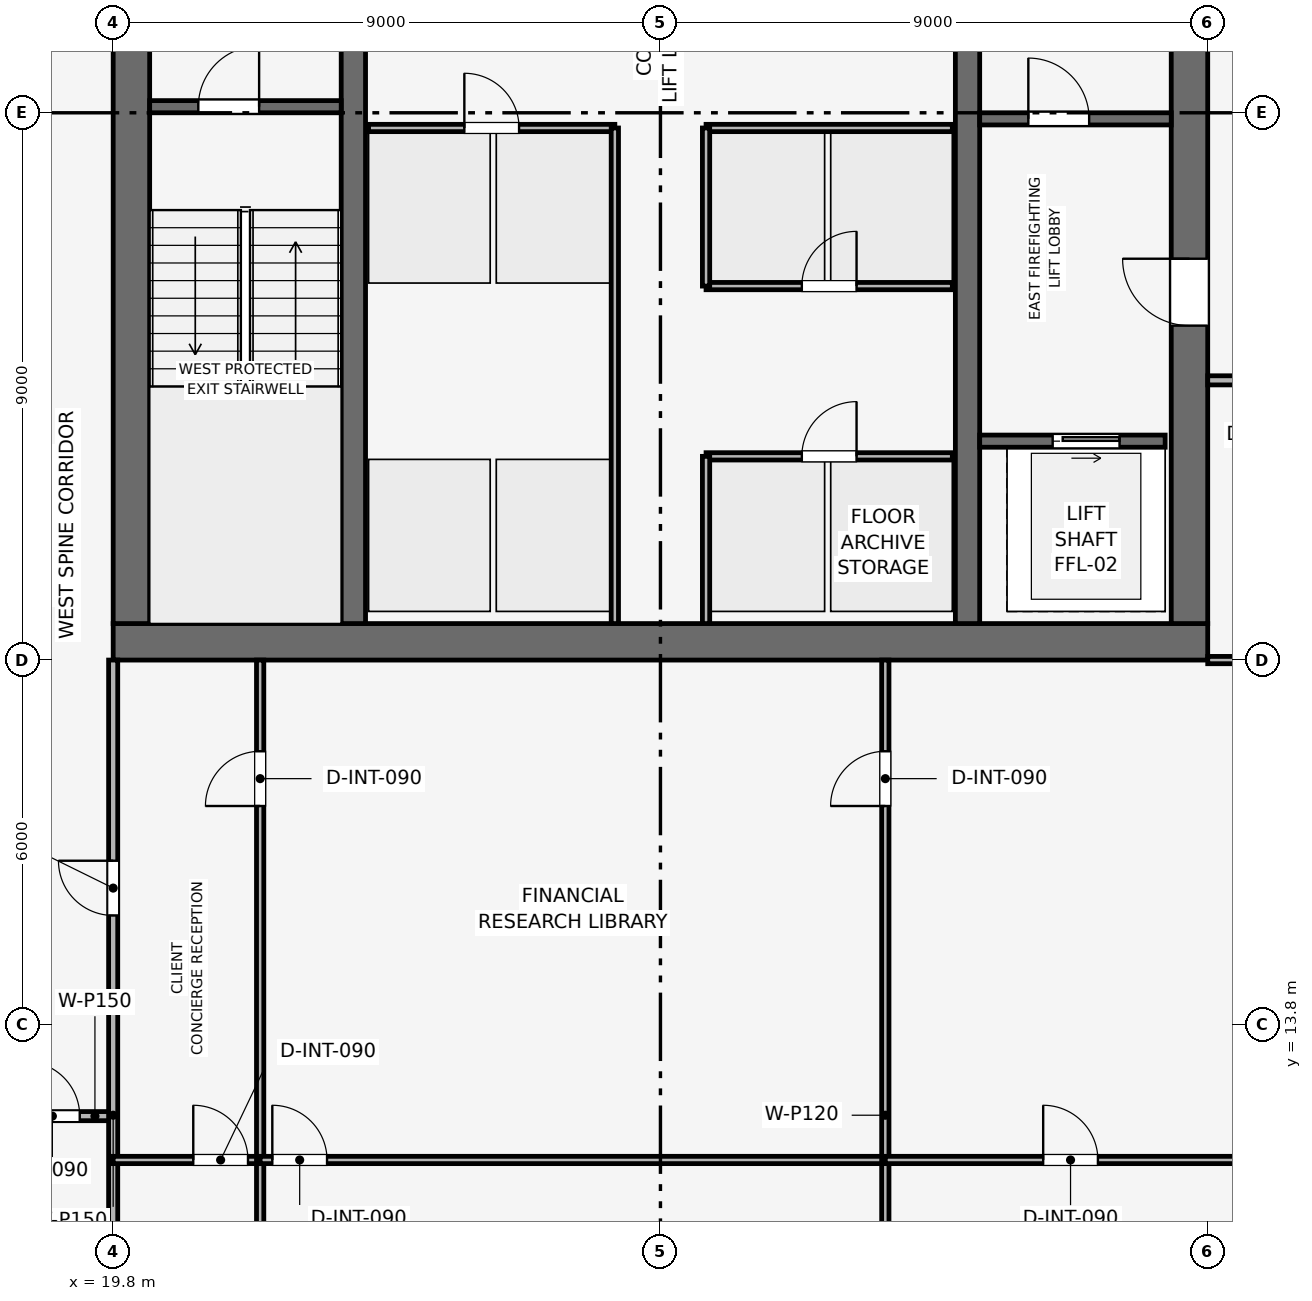
"""IFC4 building model, lengths in metres.
Left out: names, types, materials, properties, quantities, classifications, styles, units other than length and angle.
Written with IfcOpenShell. Run it as: python <this file> out.ifc"""

import sys

from ifc_helpers import new_model, si_unit, direction, frame, frame_2d, origin, place, context, subcontext, project, spatial, rectangle, extrude, element, fill, save


model = new_model("IFC4")
c1 = context("Model", 3, precision=1e-05, world=origin(), true_north=direction((0.0, 1.0)))
c2 = subcontext(c1, "Body", "Model", "MODEL_VIEW")
j1 = project(units=[si_unit("LENGTHUNIT", "METRE"), si_unit("PLANEANGLEUNIT", "RADIAN")], contexts=[c1])
p1 = place(None, origin())
s1 = spatial("IfcSite", under=j1, at=p1, CompositionType="ELEMENT")
p2 = place(p1, origin())
s2 = spatial("IfcBuilding", under=s1, at=p2, CompositionType="ELEMENT")
p3 = place(p2, frame((0.0, 0.0, 325.5)))
s3 = spatial("IfcBuildingStorey", under=s2, at=p3, CompositionType="ELEMENT", Elevation=325.5)
p4 = place(p3, frame((19.8, 20.1, 0.0), z_axis=(0.0, 0.0, 1.0), x_axis=(1.0, 0.0, 0.0)))
e1 = element("IfcWall", 1, at=p4, inside=s3, PredefinedType="SHEAR", context=c2, shape_type="SweptSolid", body=[
    extrude(rectangle(XDim=18.0, YDim=0.6, at=frame_2d((9.0, 0.0))), origin(), (0.0, 0.0, 1.0), 3.75),
])
p5 = place(p3, frame((20.1, 20.4, 0.0), z_axis=(0.0, 0.0, 1.0), x_axis=(0.0, 1.0, 0.0)))
e2 = element("IfcWall", 2, at=p5, inside=s3, PredefinedType="SHEAR", context=c2, shape_type="SweptSolid", body=[
    extrude(rectangle(XDim=16.8, YDim=0.6, at=frame_2d((8.4, 0.0))), origin(), (0.0, 0.0, 1.0), 3.75),
])
p6 = place(p5, frame((10.4, 0.0, 0.0)))
e3 = element("IfcOpeningElement", 3, at=p6, cuts=e2, PredefinedType="OPENING", context=c2, shape_type="SweptSolid", body=[
    extrude(rectangle(XDim=1.1, YDim=2.15, at=frame_2d((0.55, 1.075))), frame((0.0, 0.31, 0.0), z_axis=(0.0, -1.0, 0.0), x_axis=(1.0, 0.0, 0.0)), (0.0, 0.0, 1.0), 0.62),
])
p7 = place(p3, frame((37.5, 20.4, 0.0), z_axis=(0.0, 0.0, 1.0), x_axis=(0.0, 1.0, 0.0)))
e4 = element("IfcWall", 4, at=p7, inside=s3, PredefinedType="SHEAR", context=c2, shape_type="SweptSolid", body=[
    extrude(rectangle(XDim=16.8, YDim=0.6, at=frame_2d((8.4, 0.0))), origin(), (0.0, 0.0, 1.0), 3.75),
])
p8 = place(p7, frame((4.9, 0.0, 0.0)))
e5 = element("IfcOpeningElement", 5, at=p8, cuts=e4, PredefinedType="OPENING", context=c2, shape_type="SweptSolid", body=[
    extrude(rectangle(XDim=1.1, YDim=2.15, at=frame_2d((0.55, 1.075))), frame((0.0, 0.31, 0.0), z_axis=(0.0, -1.0, 0.0), x_axis=(1.0, 0.0, 0.0)), (0.0, 0.0, 1.0), 0.62),
])
for number, where, z_axis, x_axis in (
    (6, (23.75, 20.4, 0.0), (0.0, 0.0, 1.0), (0.0, 1.0, 0.0)),
    (7, (33.85, 20.4, 0.0), (0.0, 0.0, 1.0), (0.0, 1.0, 0.0)),
):
    element("IfcWall", number, at=place(p3, frame(where, z_axis=z_axis, x_axis=x_axis)), inside=s3, PredefinedType="SHEAR", context=c2, shape_type="SweptSolid", body=[
        extrude(rectangle(XDim=16.8, YDim=0.4, at=frame_2d((8.4, 0.0))), origin(), (0.0, 0.0, 1.0), 3.75),
    ])
p9 = place(p3, frame((20.4, 28.9, 0.0), z_axis=(0.0, 0.0, 1.0), x_axis=(1.0, 0.0, 0.0)))
e8 = element("IfcWall", 8, at=p9, inside=s3, PredefinedType="SHEAR", context=c2, shape_type="SweptSolid", body=[
    extrude(rectangle(XDim=3.15, YDim=0.2, at=frame_2d((1.575, 0.0))), origin(), (0.0, 0.0, 1.0), 3.51),
])
p10 = place(p9, frame((0.8, 0.0, 0.0)))
e9 = element("IfcOpeningElement", 9, at=p10, cuts=e8, PredefinedType="OPENING", context=c2, shape_type="SweptSolid", body=[
    extrude(rectangle(XDim=1.0, YDim=2.1, at=frame_2d((0.5, 1.05))), frame((0.0, 0.11, 0.0), z_axis=(0.0, -1.0, 0.0), x_axis=(1.0, 0.0, 0.0)), (0.0, 0.0, 1.0), 0.22),
])
p11 = place(p3, frame((34.05, 28.7, 0.0), z_axis=(0.0, 0.0, 1.0), x_axis=(1.0, 0.0, 0.0)))
e10 = element("IfcWall", 10, at=p11, inside=s3, PredefinedType="SHEAR", context=c2, shape_type="SweptSolid", body=[
    extrude(rectangle(XDim=3.15, YDim=0.2, at=frame_2d((1.575, 0.0))), origin(), (0.0, 0.0, 1.0), 3.51),
])
p12 = place(p11, frame((0.8, 0.0, 0.0)))
e11 = element("IfcOpeningElement", 11, at=p12, cuts=e10, PredefinedType="OPENING", context=c2, shape_type="SweptSolid", body=[
    extrude(rectangle(XDim=1.0, YDim=2.1, at=frame_2d((0.5, 1.05))), frame((0.0, 0.11, 0.0), z_axis=(0.0, -1.0, 0.0), x_axis=(1.0, 0.0, 0.0)), (0.0, 0.0, 1.0), 0.22),
])
p13 = place(p3, frame((34.05, 23.4, 0.0), z_axis=(0.0, 0.0, 1.0), x_axis=(1.0, 0.0, 0.0)))
e12 = element("IfcWall", 12, at=p13, inside=s3, PredefinedType="SHEAR", context=c2, shape_type="SweptSolid", body=[
    extrude(rectangle(XDim=3.05, YDim=0.2, at=frame_2d((1.525, 0.0))), origin(), (0.0, 0.0, 1.0), 3.51),
])
p14 = place(p13, frame((1.2, 0.0, 0.0)))
e13 = element("IfcOpeningElement", 13, at=p14, cuts=e12, PredefinedType="OPENING", context=c2, shape_type="SweptSolid", body=[
    extrude(rectangle(XDim=1.1, YDim=2.15, at=frame_2d((0.55, 1.075))), frame((0.0, 0.11, 0.0), z_axis=(0.0, -1.0, 0.0), x_axis=(1.0, 0.0, 0.0)), (0.0, 0.0, 1.0), 0.22),
])
p15 = place(p3, frame((24.0, 28.55, 0.0), z_axis=(0.0, 0.0, 1.0), x_axis=(1.0, 0.0, 0.0)))
e14 = element("IfcWall", 14, at=p15, inside=s3, PredefinedType="PARTITIONING", context=c2, shape_type="SweptSolid", body=[
    extrude(rectangle(XDim=4.05, YDim=0.12, at=frame_2d((2.025, 0.0))), origin(), (0.0, 0.0, 1.0), 3.51),
])
p16 = place(p15, frame((1.575, 0.0, 0.0)))
e15 = element("IfcOpeningElement", 15, at=p16, cuts=e14, PredefinedType="OPENING", context=c2, shape_type="SweptSolid", body=[
    extrude(rectangle(XDim=0.9, YDim=2.1, at=frame_2d((0.45, 1.05))), frame((0.0, 0.07, 0.0), z_axis=(0.0, -1.0, 0.0), x_axis=(1.0, 0.0, 0.0)), (0.0, 0.0, 1.0), 0.14),
])
p17 = place(p3, frame((28.05, 20.4, 0.0), z_axis=(0.0, 0.0, 1.0), x_axis=(0.0, 1.0, 0.0)))
e16 = element("IfcWall", 16, at=p17, inside=s3, PredefinedType="PARTITIONING", context=c2, shape_type="SweptSolid", body=[
    extrude(rectangle(XDim=8.15, YDim=0.12, at=frame_2d((4.075, 0.0))), origin(), (0.0, 0.0, 1.0), 3.51),
])
p18 = place(p3, frame((29.55, 23.15, 0.0), z_axis=(0.0, 0.0, 1.0), x_axis=(1.0, 0.0, 0.0)))
e17 = element("IfcWall", 17, at=p18, inside=s3, PredefinedType="PARTITIONING", context=c2, shape_type="SweptSolid", body=[
    extrude(rectangle(XDim=4.05, YDim=0.12, at=frame_2d((2.025, 0.0))), origin(), (0.0, 0.0, 1.0), 3.51),
])
p19 = place(p18, frame((1.575, 0.0, 0.0)))
e18 = element("IfcOpeningElement", 18, at=p19, cuts=e17, PredefinedType="OPENING", context=c2, shape_type="SweptSolid", body=[
    extrude(rectangle(XDim=0.9, YDim=2.1, at=frame_2d((0.45, 1.05))), frame((0.0, 0.07, 0.0), z_axis=(0.0, -1.0, 0.0), x_axis=(1.0, 0.0, 0.0)), (0.0, 0.0, 1.0), 0.14),
])
p20 = place(p3, frame((29.55, 20.4, 0.0), z_axis=(0.0, 0.0, 1.0), x_axis=(0.0, 1.0, 0.0)))
e19 = element("IfcWall", 19, at=p20, inside=s3, PredefinedType="PARTITIONING", context=c2, shape_type="SweptSolid", body=[
    extrude(rectangle(XDim=2.75, YDim=0.12, at=frame_2d((1.375, 0.0))), origin(), (0.0, 0.0, 1.0), 3.51),
])
p21 = place(p3, frame((29.55, 25.95, 0.0), z_axis=(0.0, 0.0, 1.0), x_axis=(1.0, 0.0, 0.0)))
e20 = element("IfcWall", 20, at=p21, inside=s3, PredefinedType="PARTITIONING", context=c2, shape_type="SweptSolid", body=[
    extrude(rectangle(XDim=4.05, YDim=0.12, at=frame_2d((2.025, 0.0))), origin(), (0.0, 0.0, 1.0), 3.51),
])
p22 = place(p21, frame((1.575, 0.0, 0.0)))
e21 = element("IfcOpeningElement", 21, at=p22, cuts=e20, PredefinedType="OPENING", context=c2, shape_type="SweptSolid", body=[
    extrude(rectangle(XDim=0.9, YDim=2.1, at=frame_2d((0.45, 1.05))), frame((0.0, 0.07, 0.0), z_axis=(0.0, -1.0, 0.0), x_axis=(1.0, 0.0, 0.0)), (0.0, 0.0, 1.0), 0.14),
])
p23 = place(p3, frame((29.55, 28.55, 0.0), z_axis=(0.0, 0.0, 1.0), x_axis=(1.0, 0.0, 0.0)))
e22 = element("IfcWall", 22, at=p23, inside=s3, PredefinedType="PARTITIONING", context=c2, shape_type="SweptSolid", body=[
    extrude(rectangle(XDim=4.05, YDim=0.12, at=frame_2d((2.025, 0.0))), origin(), (0.0, 0.0, 1.0), 3.51),
])
p24 = place(p3, frame((29.55, 25.95, 0.0), z_axis=(0.0, 0.0, 1.0), x_axis=(0.0, 1.0, 0.0)))
e23 = element("IfcWall", 23, at=p24, inside=s3, PredefinedType="PARTITIONING", context=c2, shape_type="SweptSolid", body=[
    extrude(rectangle(XDim=2.6, YDim=0.12, at=frame_2d((1.3, 0.0))), origin(), (0.0, 0.0, 1.0), 3.51),
])
p25 = place(p3, frame((17.9, 12.3, 0.0), z_axis=(0.0, 0.0, 1.0), x_axis=(1.0, 0.0, 0.0)))
e24 = element("IfcWall", 24, at=p25, inside=s3, PredefinedType="PARTITIONING", context=c2, shape_type="SweptSolid", body=[
    extrude(rectangle(XDim=1.9, YDim=0.15, at=frame_2d((0.95, 0.0))), origin(), (0.0, 0.0, 1.0), 3.51),
])
p26 = place(p25, frame((0.45, 0.0, 0.0)))
e25 = element("IfcOpeningElement", 25, at=p26, cuts=e24, PredefinedType="OPENING", context=c2, shape_type="SweptSolid", body=[
    extrude(rectangle(XDim=0.9, YDim=2.1, at=frame_2d((0.45, 1.05))), frame((0.0, 0.085, 0.0), z_axis=(0.0, -1.0, 0.0), x_axis=(1.0, 0.0, 0.0)), (0.0, 0.0, 1.0), 0.17),
])
p27 = place(p3, frame((19.8, 6.13, 0.0), z_axis=(0.0, 0.0, 1.0), x_axis=(0.0, 1.0, 0.0)))
e26 = element("IfcWall", 26, at=p27, inside=s3, PredefinedType="PARTITIONING", context=c2, shape_type="SweptSolid", body=[
    extrude(rectangle(XDim=13.67, YDim=0.15, at=frame_2d((6.835, 0.0))), origin(), (0.0, 0.0, 1.0), 3.095),
])
p28 = place(p27, frame((9.47, 0.0, 0.0)))
e27 = element("IfcOpeningElement", 27, at=p28, cuts=e26, PredefinedType="OPENING", context=c2, shape_type="SweptSolid", body=[
    extrude(rectangle(XDim=0.9, YDim=2.1, at=frame_2d((0.45, 1.05))), frame((0.0, 0.085, 0.0), z_axis=(0.0, -1.0, 0.0), x_axis=(1.0, 0.0, 0.0)), (0.0, 0.0, 1.0), 0.17),
])
p29 = place(p3, frame((19.8, 11.579, 0.0), z_axis=(0.0, 0.0, 1.0), x_axis=(1.0, 0.0, 0.0)))
e28 = element("IfcWall", 28, at=p29, inside=s3, PredefinedType="PARTITIONING", context=c2, shape_type="SweptSolid", body=[
    extrude(rectangle(XDim=2.417, YDim=0.12, at=frame_2d((1.208, 0.0))), origin(), (0.0, 0.0, 1.0), 3.095),
])
p30 = place(p29, frame((1.317, 0.0, 0.0)))
e29 = element("IfcOpeningElement", 29, at=p30, cuts=e28, PredefinedType="OPENING", context=c2, shape_type="SweptSolid", body=[
    extrude(rectangle(XDim=0.9, YDim=2.1, at=frame_2d((0.45, 1.05))), frame((0.0, 0.07, 0.0), z_axis=(0.0, -1.0, 0.0), x_axis=(1.0, 0.0, 0.0)), (0.0, 0.0, 1.0), 0.14),
])
p31 = place(p3, frame((22.217, 6.13, 0.0), z_axis=(0.0, 0.0, 1.0), x_axis=(0.0, 1.0, 0.0)))
e30 = element("IfcWall", 30, at=p31, inside=s3, PredefinedType="PARTITIONING", context=c2, shape_type="SweptSolid", body=[
    extrude(rectangle(XDim=13.67, YDim=0.12, at=frame_2d((6.835, 0.0))), origin(), (0.0, 0.0, 1.0), 3.135),
])
p32 = place(p31, frame((11.27, 0.0, 0.0)))
e31 = element("IfcOpeningElement", 31, at=p32, cuts=e30, PredefinedType="OPENING", context=c2, shape_type="SweptSolid", body=[
    extrude(rectangle(XDim=0.9, YDim=2.1, at=frame_2d((0.45, 1.05))), frame((0.0, 0.07, 0.0), z_axis=(0.0, -1.0, 0.0), x_axis=(1.0, 0.0, 0.0)), (0.0, 0.0, 1.0), 0.14),
])
p33 = place(p3, frame((22.217, 11.579, 0.0), z_axis=(0.0, 0.0, 1.0), x_axis=(1.0, 0.0, 0.0)))
e32 = element("IfcWall", 32, at=p33, inside=s3, PredefinedType="PARTITIONING", context=c2, shape_type="SweptSolid", body=[
    extrude(rectangle(XDim=10.281, YDim=0.12, at=frame_2d((5.141, 0.0))), origin(), (0.0, 0.0, 1.0), 3.095),
])
p34 = place(p33, frame((0.2, 0.0, 0.0)))
e33 = element("IfcOpeningElement", 33, at=p34, cuts=e32, PredefinedType="OPENING", context=c2, shape_type="SweptSolid", body=[
    extrude(rectangle(XDim=0.9, YDim=2.1, at=frame_2d((0.45, 1.05))), frame((0.0, 0.07, 0.0), z_axis=(0.0, -1.0, 0.0), x_axis=(1.0, 0.0, 0.0)), (0.0, 0.0, 1.0), 0.14),
])
p35 = place(p3, frame((32.498, 6.13, 0.0), z_axis=(0.0, 0.0, 1.0), x_axis=(0.0, 1.0, 0.0)))
e34 = element("IfcWall", 34, at=p35, inside=s3, PredefinedType="PARTITIONING", context=c2, shape_type="SweptSolid", body=[
    extrude(rectangle(XDim=13.67, YDim=0.12, at=frame_2d((6.835, 0.0))), origin(), (0.0, 0.0, 1.0), 3.135),
])
p36 = place(p35, frame((11.27, 0.0, 0.0)))
e35 = element("IfcOpeningElement", 35, at=p36, cuts=e34, PredefinedType="OPENING", context=c2, shape_type="SweptSolid", body=[
    extrude(rectangle(XDim=0.9, YDim=2.1, at=frame_2d((0.45, 1.05))), frame((0.0, 0.07, 0.0), z_axis=(0.0, -1.0, 0.0), x_axis=(1.0, 0.0, 0.0)), (0.0, 0.0, 1.0), 0.14),
])
p37 = place(p3, frame((32.498, 11.579, 0.0), z_axis=(0.0, 0.0, 1.0), x_axis=(1.0, 0.0, 0.0)))
e36 = element("IfcWall", 36, at=p37, inside=s3, PredefinedType="PARTITIONING", context=c2, shape_type="SweptSolid", body=[
    extrude(rectangle(XDim=12.802, YDim=0.12, at=frame_2d((6.401, 0.0))), origin(), (0.0, 0.0, 1.0), 3.095),
])
p38 = place(p37, frame((2.596, 0.0, 0.0)))
e37 = element("IfcOpeningElement", 37, at=p38, cuts=e36, PredefinedType="OPENING", context=c2, shape_type="SweptSolid", body=[
    extrude(rectangle(XDim=0.9, YDim=2.1, at=frame_2d((0.45, 1.05))), frame((0.0, 0.07, 0.0), z_axis=(0.0, -1.0, 0.0), x_axis=(1.0, 0.0, 0.0)), (0.0, 0.0, 1.0), 0.14),
])
p39 = place(p3, frame((37.8, 19.8, 0.0), z_axis=(0.0, 0.0, 1.0), x_axis=(1.0, 0.0, 0.0)))
e38 = element("IfcWall", 38, at=p39, inside=s3, PredefinedType="PARTITIONING", context=c2, shape_type="SweptSolid", body=[
    extrude(rectangle(XDim=13.67, YDim=0.12, at=frame_2d((6.835, 0.0))), origin(), (0.0, 0.0, 1.0), 3.095),
])
p40 = place(p3, frame((37.8, 24.4, 0.0), z_axis=(0.0, 0.0, 1.0), x_axis=(1.0, 0.0, 0.0)))
e39 = element("IfcWall", 39, at=p40, inside=s3, PredefinedType="PARTITIONING", context=c2, shape_type="SweptSolid", body=[
    extrude(rectangle(XDim=1.9, YDim=0.15, at=frame_2d((0.95, 0.0))), origin(), (0.0, 0.0, 1.0), 3.51),
])
p41 = place(p40, frame((0.45, 0.0, 0.0)))
e40 = element("IfcOpeningElement", 40, at=p41, cuts=e39, PredefinedType="OPENING", context=c2, shape_type="SweptSolid", body=[
    extrude(rectangle(XDim=0.9, YDim=2.1, at=frame_2d((0.45, 1.05))), frame((0.0, 0.085, 0.0), z_axis=(0.0, -1.0, 0.0), x_axis=(1.0, 0.0, 0.0)), (0.0, 0.0, 1.0), 0.17),
])
p42 = place(p10, origin())
e41 = element("IfcDoor", 41, at=p42, inside=s3, OperationType="SINGLE_SWING_RIGHT", PredefinedType="DOOR", context=c2, shape_type="SweptSolid", body=[
    extrude(rectangle(XDim=1.0, YDim=2.1, at=frame_2d((0.5, 1.05))), frame((0.0, 0.025, 0.0), z_axis=(0.0, -1.0, 0.0), x_axis=(1.0, 0.0, 0.0)), (0.0, 0.0, 1.0), 0.05),
])
fill(e9, e41)
p43 = place(p12, origin())
e42 = element("IfcDoor", 42, at=p43, inside=s3, OperationType="SINGLE_SWING_LEFT", PredefinedType="DOOR", context=c2, shape_type="SweptSolid", body=[
    extrude(rectangle(XDim=1.0, YDim=2.1, at=frame_2d((0.5, 1.05))), frame((0.0, 0.025, 0.0), z_axis=(0.0, -1.0, 0.0), x_axis=(1.0, 0.0, 0.0)), (0.0, 0.0, 1.0), 0.05),
])
fill(e11, e42)
p44 = place(p14, origin())
e43 = element("IfcDoor", 43, at=p44, inside=s3, OperationType="SLIDING_TO_RIGHT", PredefinedType="DOOR", context=c2, shape_type="SweptSolid", body=[
    extrude(rectangle(XDim=1.1, YDim=2.15, at=frame_2d((0.55, 1.075))), frame((0.0, 0.025, 0.0), z_axis=(0.0, -1.0, 0.0), x_axis=(1.0, 0.0, 0.0)), (0.0, 0.0, 1.0), 0.05),
])
fill(e13, e43)
p45 = place(p16, origin())
e44 = element("IfcDoor", 44, at=p45, inside=s3, OperationType="SINGLE_SWING_LEFT", PredefinedType="DOOR", context=c2, shape_type="SweptSolid", body=[
    extrude(rectangle(XDim=0.9, YDim=2.1, at=frame_2d((0.45, 1.05))), frame((0.0, 0.025, 0.0), z_axis=(0.0, -1.0, 0.0), x_axis=(1.0, 0.0, 0.0)), (0.0, 0.0, 1.0), 0.05),
])
fill(e15, e44)
p46 = place(p19, origin())
e45 = element("IfcDoor", 45, at=p46, inside=s3, OperationType="SINGLE_SWING_RIGHT", PredefinedType="DOOR", context=c2, shape_type="SweptSolid", body=[
    extrude(rectangle(XDim=0.9, YDim=2.1, at=frame_2d((0.45, 1.05))), frame((0.0, 0.025, 0.0), z_axis=(0.0, -1.0, 0.0), x_axis=(1.0, 0.0, 0.0)), (0.0, 0.0, 1.0), 0.05),
])
fill(e18, e45)
p47 = place(p22, origin())
e46 = element("IfcDoor", 46, at=p47, inside=s3, OperationType="SINGLE_SWING_RIGHT", PredefinedType="DOOR", context=c2, shape_type="SweptSolid", body=[
    extrude(rectangle(XDim=0.9, YDim=2.1, at=frame_2d((0.45, 1.05))), frame((0.0, 0.025, 0.0), z_axis=(0.0, -1.0, 0.0), x_axis=(1.0, 0.0, 0.0)), (0.0, 0.0, 1.0), 0.05),
])
fill(e21, e46)
p48 = place(p26, origin())
e47 = element("IfcDoor", 47, at=p48, inside=s3, OperationType="SINGLE_SWING_LEFT", PredefinedType="DOOR", context=c2, shape_type="SweptSolid", body=[
    extrude(rectangle(XDim=0.9, YDim=2.1, at=frame_2d((0.45, 1.05))), frame((0.0, 0.025, 0.0), z_axis=(0.0, -1.0, 0.0), x_axis=(1.0, 0.0, 0.0)), (0.0, 0.0, 1.0), 0.05),
])
fill(e25, e47)
p49 = place(p28, origin())
e48 = element("IfcDoor", 48, at=p49, inside=s3, OperationType="SINGLE_SWING_RIGHT", PredefinedType="DOOR", context=c2, shape_type="SweptSolid", body=[
    extrude(rectangle(XDim=0.9, YDim=2.1, at=frame_2d((0.45, 1.05))), frame((0.0, 0.025, 0.0), z_axis=(0.0, -1.0, 0.0), x_axis=(1.0, 0.0, 0.0)), (0.0, 0.0, 1.0), 0.05),
])
fill(e27, e48)
p50 = place(p30, origin())
e49 = element("IfcDoor", 49, at=p50, inside=s3, OperationType="SINGLE_SWING_LEFT", PredefinedType="DOOR", context=c2, shape_type="SweptSolid", body=[
    extrude(rectangle(XDim=0.9, YDim=2.1, at=frame_2d((0.45, 1.05))), frame((0.0, 0.025, 0.0), z_axis=(0.0, -1.0, 0.0), x_axis=(1.0, 0.0, 0.0)), (0.0, 0.0, 1.0), 0.05),
])
fill(e29, e49)
p51 = place(p32, origin())
e50 = element("IfcDoor", 50, at=p51, inside=s3, OperationType="SINGLE_SWING_LEFT", PredefinedType="DOOR", context=c2, shape_type="SweptSolid", body=[
    extrude(rectangle(XDim=0.9, YDim=2.1, at=frame_2d((0.45, 1.05))), frame((0.0, 0.025, 0.0), z_axis=(0.0, -1.0, 0.0), x_axis=(1.0, 0.0, 0.0)), (0.0, 0.0, 1.0), 0.05),
])
fill(e31, e50)
p52 = place(p34, origin())
e51 = element("IfcDoor", 51, at=p52, inside=s3, OperationType="SINGLE_SWING_LEFT", PredefinedType="DOOR", context=c2, shape_type="SweptSolid", body=[
    extrude(rectangle(XDim=0.9, YDim=2.1, at=frame_2d((0.45, 1.05))), frame((0.0, 0.025, 0.0), z_axis=(0.0, -1.0, 0.0), x_axis=(1.0, 0.0, 0.0)), (0.0, 0.0, 1.0), 0.05),
])
fill(e33, e51)
p53 = place(p36, origin())
e52 = element("IfcDoor", 52, at=p53, inside=s3, OperationType="SINGLE_SWING_LEFT", PredefinedType="DOOR", context=c2, shape_type="SweptSolid", body=[
    extrude(rectangle(XDim=0.9, YDim=2.1, at=frame_2d((0.45, 1.05))), frame((0.0, 0.025, 0.0), z_axis=(0.0, -1.0, 0.0), x_axis=(1.0, 0.0, 0.0)), (0.0, 0.0, 1.0), 0.05),
])
fill(e35, e52)
p54 = place(p38, origin())
e53 = element("IfcDoor", 53, at=p54, inside=s3, OperationType="SINGLE_SWING_LEFT", PredefinedType="DOOR", context=c2, shape_type="SweptSolid", body=[
    extrude(rectangle(XDim=0.9, YDim=2.1, at=frame_2d((0.45, 1.05))), frame((0.0, 0.025, 0.0), z_axis=(0.0, -1.0, 0.0), x_axis=(1.0, 0.0, 0.0)), (0.0, 0.0, 1.0), 0.05),
])
fill(e37, e53)
p55 = place(p8, origin())
e54 = element("IfcDoor", 54, at=p55, inside=s3, OperationType="SINGLE_SWING_RIGHT", PredefinedType="DOOR", context=c2, shape_type="SweptSolid", body=[
    extrude(rectangle(XDim=1.1, YDim=2.15, at=frame_2d((0.55, 1.075))), frame((0.0, 0.025, 0.0), z_axis=(0.0, -1.0, 0.0), x_axis=(1.0, 0.0, 0.0)), (0.0, 0.0, 1.0), 0.05),
])
fill(e5, e54)
save(model, sys.argv[1])
